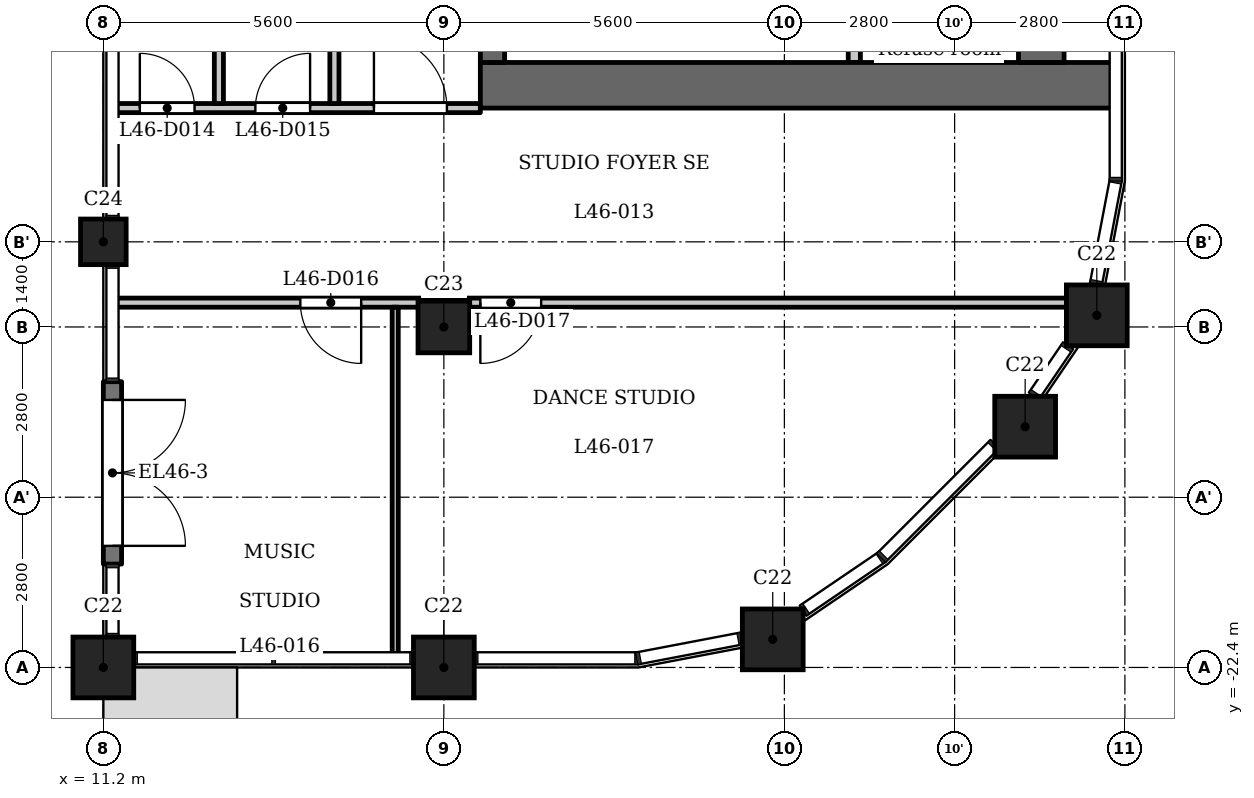
"""IFC4 building model, lengths in metres.
Left out: names, types, materials, properties, quantities, classifications, styles, units other than length and angle.
Written with IfcOpenShell. Run it as: python <this file> out.ifc"""

import sys

from ifc_helpers import new_model, si_unit, direction, frame, frame_2d, origin, origin_2d, place, context, subcontext, project, spatial, rectangle, extrude, element, fill, save


model = new_model("IFC4")
c1 = context("Model", 3, precision=1e-05, world=origin(), true_north=direction((0.0, 1.0)))
c2 = subcontext(c1, "Body", "Model", "MODEL_VIEW")
j1 = project(units=[si_unit("LENGTHUNIT", "METRE"), si_unit("PLANEANGLEUNIT", "RADIAN")], contexts=[c1])
p1 = place(None, origin())
s1 = spatial("IfcSite", under=j1, at=p1, CompositionType="ELEMENT")
p2 = place(p1, origin())
s2 = spatial("IfcBuilding", under=s1, at=p2, CompositionType="ELEMENT")
p3 = place(p2, frame((0.0, 0.0, 178.1)))
s3 = spatial("IfcBuildingStorey", under=s2, at=p3, CompositionType="ELEMENT", Elevation=178.1)
for number, where, z_axis, x_axis in (
    (1, (11.2, -22.4, 0.0), (0.0, 0.0, 1.0), (1.0, 0.0, 0.0)),
    (2, (16.8, -22.4, 0.0), (0.0, 0.0, 1.0), (1.0, 0.0, 0.0)),
    (3, (22.209, -21.938, 0.0), (0.0, 0.0, 1.0), (1.0, 0.0, 0.0)),
    (4, (26.36, -18.44, 0.0), (0.0, 0.0, 1.0), (1.0, 0.0, 0.0)),
    (5, (27.538, -16.609, 0.0), (0.0, 0.0, 1.0), (1.0, 0.0, 0.0)),
):
    element("IfcColumn", number, at=place(p3, frame(where, z_axis=z_axis, x_axis=x_axis)), inside=s3, PredefinedType="COLUMN", context=c2, shape_type="SweptSolid", body=[
        extrude(rectangle(XDim=1.0, YDim=1.0, at=origin_2d()), origin(), (0.0, 0.0, 1.0), 5.4),
    ])
p4 = place(p3, frame((16.8, -16.8, 0.0), z_axis=(0.0, 0.0, 1.0), x_axis=(1.0, 0.0, 0.0)))
e6 = element("IfcColumn", 6, at=p4, inside=s3, PredefinedType="COLUMN", context=c2, shape_type="SweptSolid", body=[
    extrude(rectangle(XDim=0.85, YDim=0.85, at=origin_2d()), origin(), (0.0, 0.0, 1.0), 5.4),
])
p5 = place(p3, frame((11.2, -15.4, 0.0), z_axis=(0.0, 0.0, 1.0), x_axis=(1.0, 0.0, 0.0)))
e7 = element("IfcColumn", 7, at=p5, inside=s3, PredefinedType="COLUMN", context=c2, shape_type="SweptSolid", body=[
    extrude(rectangle(XDim=0.75, YDim=0.75, at=origin_2d()), origin(), (0.0, 0.0, 1.0), 5.4),
])
p6 = place(p3, frame((11.35, -17.7, 0.0), z_axis=(0.0, 0.0, 1.0), x_axis=(0.0, -1.0, 0.0)))
e8 = element("IfcWall", 8, at=p6, inside=s3, PredefinedType="SOLIDWALL", context=c2, shape_type="SweptSolid", body=[
    extrude(rectangle(XDim=3.0, YDim=0.3, at=frame_2d((1.5, 0.0))), origin(), (0.0, 0.0, 1.0), 4.95),
])
p7 = place(p6, frame((0.3, 0.0, 0.0)))
e9 = element("IfcOpeningElement", 9, at=p7, cuts=e8, PredefinedType="OPENING", context=c2, shape_type="SweptSolid", body=[
    extrude(rectangle(XDim=2.4, YDim=2.3, at=frame_2d((1.2, 1.15))), frame((0.0, 0.16, 0.0), z_axis=(0.0, -1.0, 0.0), x_axis=(1.0, 0.0, 0.0)), (0.0, 0.0, 1.0), 0.32),
])
p8 = place(p3, frame((17.4, -12.825, 0.0), z_axis=(0.0, 0.0, 1.0), x_axis=(1.0, 0.0, 0.0)))
e10 = element("IfcWall", 10, at=p8, inside=s3, PredefinedType="SHEAR", context=c2, shape_type="SweptSolid", body=[
    extrude(rectangle(XDim=10.4, YDim=0.75, at=frame_2d((5.2, 0.0))), origin(), (0.0, 0.0, 1.0), 4.95),
])
p9 = place(p3, frame((17.6, -12.45, 0.0), z_axis=(0.0, 0.0, 1.0), x_axis=(0.0, 1.0, 0.0)))
e11 = element("IfcWall", 11, at=p9, inside=s3, PredefinedType="SHEAR", context=c2, shape_type="SweptSolid", body=[
    extrude(rectangle(XDim=24.9, YDim=0.4, at=frame_2d((12.45, 0.0))), origin(), (0.0, 0.0, 1.0), 4.95),
])
p10 = place(p9, frame((6.85, 0.0, 0.0)))
e12 = element("IfcOpeningElement", 12, at=p10, cuts=e11, PredefinedType="OPENING", context=c2, shape_type="SweptSolid", body=[
    extrude(rectangle(XDim=0.9, YDim=2.1, at=frame_2d((0.45, 1.05))), frame((0.0, 0.21, 0.0), z_axis=(0.0, -1.0, 0.0), x_axis=(1.0, 0.0, 0.0)), (0.0, 0.0, 1.0), 0.42),
])
p11 = place(p9, frame((10.45, 0.0, 0.0)))
e13 = element("IfcOpeningElement", 13, at=p11, cuts=e11, PredefinedType="OPENING", context=c2, shape_type="SweptSolid", body=[
    extrude(rectangle(XDim=0.9, YDim=2.1, at=frame_2d((0.45, 1.05))), frame((0.0, 0.21, 0.0), z_axis=(0.0, -1.0, 0.0), x_axis=(1.0, 0.0, 0.0)), (0.0, 0.0, 1.0), 0.42),
])
p12 = place(p9, frame((15.6, 0.0, 0.0)))
e14 = element("IfcOpeningElement", 14, at=p12, cuts=e11, PredefinedType="OPENING", context=c2, shape_type="SweptSolid", body=[
    extrude(rectangle(XDim=1.1, YDim=2.1, at=frame_2d((0.55, 1.05))), frame((0.0, 0.21, 0.0), z_axis=(0.0, -1.0, 0.0), x_axis=(1.0, 0.0, 0.0)), (0.0, 0.0, 1.0), 0.42),
])
p13 = place(p9, frame((18.0, 0.0, 0.0)))
e15 = element("IfcOpeningElement", 15, at=p13, cuts=e11, PredefinedType="OPENING", context=c2, shape_type="SweptSolid", body=[
    extrude(rectangle(XDim=1.1, YDim=2.1, at=frame_2d((0.55, 1.05))), frame((0.0, 0.21, 0.0), z_axis=(0.0, -1.0, 0.0), x_axis=(1.0, 0.0, 0.0)), (0.0, 0.0, 1.0), 0.42),
])
p14 = place(p9, frame((23.025, 0.0, 0.0)))
e16 = element("IfcOpeningElement", 16, at=p14, cuts=e11, PredefinedType="OPENING", context=c2, shape_type="SweptSolid", body=[
    extrude(rectangle(XDim=1.1, YDim=2.1, at=frame_2d((0.55, 1.05))), frame((0.0, 0.21, 0.0), z_axis=(0.0, -1.0, 0.0), x_axis=(1.0, 0.0, 0.0)), (0.0, 0.0, 1.0), 0.42),
])
p15 = place(p9, frame((0.775, 0.0, 0.0)))
e17 = element("IfcOpeningElement", 17, at=p15, cuts=e11, PredefinedType="OPENING", context=c2, shape_type="SweptSolid", body=[
    extrude(rectangle(XDim=1.1, YDim=2.1, at=frame_2d((0.55, 1.05))), frame((0.0, 0.21, 0.0), z_axis=(0.0, -1.0, 0.0), x_axis=(1.0, 0.0, 0.0)), (0.0, 0.0, 1.0), 0.42),
])
p16 = place(p9, frame((12.925, 0.0, 0.0)))
e18 = element("IfcOpeningElement", 18, at=p16, cuts=e11, PredefinedType="OPENING", context=c2, shape_type="SweptSolid", body=[
    extrude(rectangle(XDim=1.8, YDim=2.1, at=frame_2d((0.9, 1.05))), frame((0.0, 0.21, 0.0), z_axis=(0.0, -1.0, 0.0), x_axis=(1.0, 0.0, 0.0)), (0.0, 0.0, 1.0), 0.42),
])
p17 = place(p3, frame((26.625, -12.45, 0.0), z_axis=(0.0, 0.0, 1.0), x_axis=(0.0, 1.0, 0.0)))
e19 = element("IfcWall", 19, at=p17, inside=s3, PredefinedType="SHEAR", context=c2, shape_type="SweptSolid", body=[
    extrude(rectangle(XDim=24.9, YDim=0.75, at=frame_2d((12.45, 0.0))), origin(), (0.0, 0.0, 1.0), 4.95),
])
p18 = place(p3, frame((23.55, -12.45, 0.0), z_axis=(0.0, 0.0, 1.0), x_axis=(0.0, 1.0, 0.0)))
e20 = element("IfcWall", 20, at=p18, inside=s3, PredefinedType="PARTITIONING", context=c2, shape_type="SweptSolid", body=[
    extrude(rectangle(XDim=2.65, YDim=0.2, at=frame_2d((1.325, 0.0))), origin(), (0.0, 0.0, 1.0), 4.95),
])
p19 = place(p18, frame((0.875, 0.0, 0.0)))
e21 = element("IfcOpeningElement", 21, at=p19, cuts=e20, PredefinedType="OPENING", context=c2, shape_type="SweptSolid", body=[
    extrude(rectangle(XDim=0.9, YDim=2.1, at=frame_2d((0.45, 1.05))), frame((0.0, 0.11, 0.0), z_axis=(0.0, -1.0, 0.0), x_axis=(1.0, 0.0, 0.0)), (0.0, 0.0, 1.0), 0.22),
])
p20 = place(p3, frame((11.384, -16.4, 0.0), z_axis=(0.0, 0.0, 1.0), x_axis=(1.0, 0.0, 0.0)))
e22 = element("IfcWall", 22, at=p20, inside=s3, PredefinedType="PARTITIONING", context=c2, shape_type="SweptSolid", body=[
    extrude(rectangle(XDim=16.136, YDim=0.15, at=frame_2d((8.068, 0.0))), origin(), (0.0, 0.0, 1.0), 4.95),
])
p21 = place(p20, frame((3.056, 0.0, 0.0)))
e23 = element("IfcOpeningElement", 23, at=p21, cuts=e22, PredefinedType="OPENING", context=c2, shape_type="SweptSolid", body=[
    extrude(rectangle(XDim=1.0, YDim=2.1, at=frame_2d((0.5, 1.05))), frame((0.0, 0.085, 0.0), z_axis=(0.0, -1.0, 0.0), x_axis=(1.0, 0.0, 0.0)), (0.0, 0.0, 1.0), 0.17),
])
p22 = place(p20, frame((6.016, 0.0, 0.0)))
e24 = element("IfcOpeningElement", 24, at=p22, cuts=e22, PredefinedType="OPENING", context=c2, shape_type="SweptSolid", body=[
    extrude(rectangle(XDim=1.0, YDim=2.1, at=frame_2d((0.5, 1.05))), frame((0.0, 0.085, 0.0), z_axis=(0.0, -1.0, 0.0), x_axis=(1.0, 0.0, 0.0)), (0.0, 0.0, 1.0), 0.17),
])
p23 = place(p3, frame((11.384, -13.2, 0.0), z_axis=(0.0, 0.0, 1.0), x_axis=(1.0, 0.0, 0.0)))
e25 = element("IfcWall", 25, at=p23, inside=s3, PredefinedType="PARTITIONING", context=c2, shape_type="SweptSolid", body=[
    extrude(rectangle(XDim=6.016, YDim=0.15, at=frame_2d((3.008, 0.0))), origin(), (0.0, 0.0, 1.0), 4.95),
])
p24 = place(p23, frame((4.266, 0.0, 0.0)))
e26 = element("IfcOpeningElement", 26, at=p24, cuts=e25, PredefinedType="OPENING", context=c2, shape_type="SweptSolid", body=[
    extrude(rectangle(XDim=1.2, YDim=2.1, at=frame_2d((0.6, 1.05))), frame((0.0, 0.085, 0.0), z_axis=(0.0, -1.0, 0.0), x_axis=(1.0, 0.0, 0.0)), (0.0, 0.0, 1.0), 0.17),
])
p25 = place(p23, frame((0.416, 0.0, 0.0)))
e27 = element("IfcOpeningElement", 27, at=p25, cuts=e25, PredefinedType="OPENING", context=c2, shape_type="SweptSolid", body=[
    extrude(rectangle(XDim=0.9, YDim=2.1, at=frame_2d((0.45, 1.05))), frame((0.0, 0.085, 0.0), z_axis=(0.0, -1.0, 0.0), x_axis=(1.0, 0.0, 0.0)), (0.0, 0.0, 1.0), 0.17),
])
p26 = place(p23, frame((2.316, 0.0, 0.0)))
e28 = element("IfcOpeningElement", 28, at=p26, cuts=e25, PredefinedType="OPENING", context=c2, shape_type="SweptSolid", body=[
    extrude(rectangle(XDim=0.9, YDim=2.1, at=frame_2d((0.45, 1.05))), frame((0.0, 0.085, 0.0), z_axis=(0.0, -1.0, 0.0), x_axis=(1.0, 0.0, 0.0)), (0.0, 0.0, 1.0), 0.17),
])
p27 = place(p3, frame((13.1, -13.125, 0.0), z_axis=(0.0, 0.0, 1.0), x_axis=(0.0, 1.0, 0.0)))
e29 = element("IfcWall", 29, at=p27, inside=s3, PredefinedType="PARTITIONING", context=c2, shape_type="SweptSolid", body=[
    extrude(rectangle(XDim=5.941, YDim=0.15, at=frame_2d((2.97, 0.0))), origin(), (0.0, 0.0, 1.0), 4.95),
])
p28 = place(p3, frame((15.0, -13.125, 0.0), z_axis=(0.0, 0.0, 1.0), x_axis=(0.0, 1.0, 0.0)))
e30 = element("IfcWall", 30, at=p28, inside=s3, PredefinedType="PARTITIONING", context=c2, shape_type="SweptSolid", body=[
    extrude(rectangle(XDim=6.356, YDim=0.15, at=frame_2d((3.178, 0.0))), origin(), (0.0, 0.0, 1.0), 4.95),
])
p29 = place(p3, frame((16.0, -22.216, 0.0), z_axis=(0.0, 0.0, 1.0), x_axis=(0.0, 1.0, 0.0)))
e31 = element("IfcWall", 31, at=p29, inside=s3, PredefinedType="PARTITIONING", context=c2, shape_type="SweptSolid", body=[
    extrude(rectangle(XDim=5.741, YDim=0.1, at=frame_2d((2.871, 0.0))), origin(), (0.0, 0.0, 1.0), 4.95),
])
p30 = place(p7, origin())
e32 = element("IfcDoor", 32, at=p30, inside=s3, OperationType="SINGLE_SWING_LEFT", PredefinedType="DOOR", context=c2, shape_type="SweptSolid", body=[
    extrude(rectangle(XDim=2.4, YDim=2.3, at=frame_2d((1.2, 1.15))), frame((0.0, 0.025, 0.0), z_axis=(0.0, -1.0, 0.0), x_axis=(1.0, 0.0, 0.0)), (0.0, 0.0, 1.0), 0.05),
])
fill(e9, e32)
p31 = place(p24, origin())
e33 = element("IfcDoor", 33, at=p31, inside=s3, OperationType="SINGLE_SWING_RIGHT", PredefinedType="DOOR", context=c2, shape_type="SweptSolid", body=[
    extrude(rectangle(XDim=1.2, YDim=2.1, at=frame_2d((0.6, 1.05))), frame((0.0, 0.025, 0.0), z_axis=(0.0, -1.0, 0.0), x_axis=(1.0, 0.0, 0.0)), (0.0, 0.0, 1.0), 0.05),
])
fill(e26, e33)
p32 = place(p25, origin())
e34 = element("IfcDoor", 34, at=p32, inside=s3, OperationType="SINGLE_SWING_RIGHT", PredefinedType="DOOR", context=c2, shape_type="SweptSolid", body=[
    extrude(rectangle(XDim=0.9, YDim=2.1, at=frame_2d((0.45, 1.05))), frame((0.0, 0.025, 0.0), z_axis=(0.0, -1.0, 0.0), x_axis=(1.0, 0.0, 0.0)), (0.0, 0.0, 1.0), 0.05),
])
fill(e27, e34)
p33 = place(p26, origin())
e35 = element("IfcDoor", 35, at=p33, inside=s3, OperationType="SINGLE_SWING_LEFT", PredefinedType="DOOR", context=c2, shape_type="SweptSolid", body=[
    extrude(rectangle(XDim=0.9, YDim=2.1, at=frame_2d((0.45, 1.05))), frame((0.0, 0.025, 0.0), z_axis=(0.0, -1.0, 0.0), x_axis=(1.0, 0.0, 0.0)), (0.0, 0.0, 1.0), 0.05),
])
fill(e28, e35)
p34 = place(p21, origin())
e36 = element("IfcDoor", 36, at=p34, inside=s3, OperationType="SINGLE_SWING_RIGHT", PredefinedType="DOOR", context=c2, shape_type="SweptSolid", body=[
    extrude(rectangle(XDim=1.0, YDim=2.1, at=frame_2d((0.5, 1.05))), frame((0.0, 0.025, 0.0), z_axis=(0.0, -1.0, 0.0), x_axis=(1.0, 0.0, 0.0)), (0.0, 0.0, 1.0), 0.05),
])
fill(e23, e36)
p35 = place(p22, origin())
e37 = element("IfcDoor", 37, at=p35, inside=s3, OperationType="SINGLE_SWING_LEFT", PredefinedType="DOOR", context=c2, shape_type="SweptSolid", body=[
    extrude(rectangle(XDim=1.0, YDim=2.1, at=frame_2d((0.5, 1.05))), frame((0.0, 0.025, 0.0), z_axis=(0.0, -1.0, 0.0), x_axis=(1.0, 0.0, 0.0)), (0.0, 0.0, 1.0), 0.05),
])
fill(e24, e37)
save(model, sys.argv[1])
